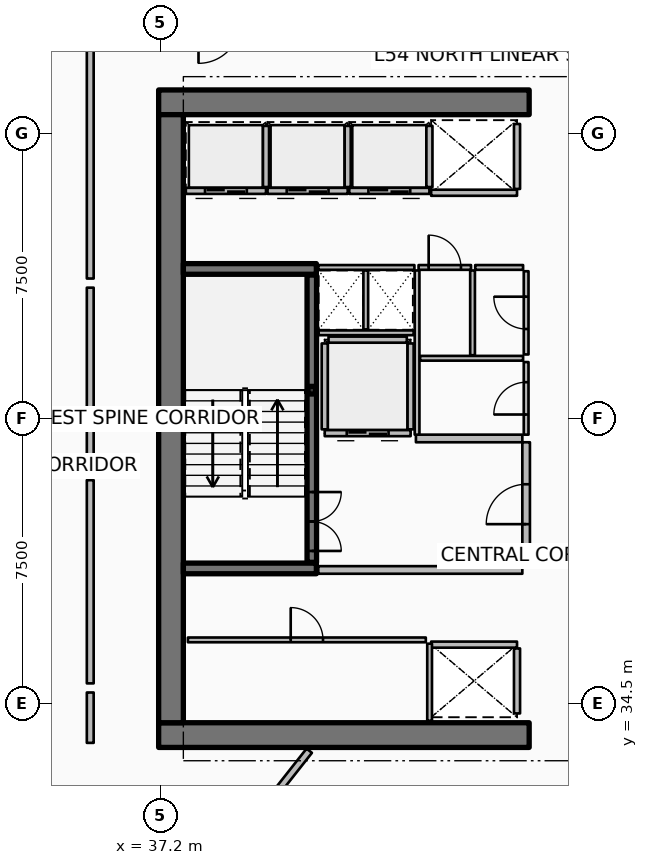
"""IFC4 building model, lengths in metres.
Left out: names, types, materials, properties, quantities, classifications, styles, units other than length and angle.
Written with IfcOpenShell. Run it as: python <this file> out.ifc"""

import sys

from ifc_helpers import new_model, si_unit, direction, frame, frame_2d, origin, origin_2d, place, context, subcontext, project, spatial, rectangle, hollow_rectangle, extrude, element, fill, save


model = new_model("IFC4")
c1 = context("Model", 3, precision=1e-05, world=origin(), true_north=direction((0.0, 1.0)))
c2 = subcontext(c1, "Body", "Model", "MODEL_VIEW")
j1 = project(units=[si_unit("LENGTHUNIT", "METRE"), si_unit("PLANEANGLEUNIT", "RADIAN")], contexts=[c1])
p1 = place(None, origin())
s1 = spatial("IfcSite", under=j1, at=p1, CompositionType="ELEMENT")
p2 = place(p1, origin())
s2 = spatial("IfcBuilding", under=s1, at=p2, CompositionType="ELEMENT")
p3 = place(p2, frame((0.0, 0.0, 214.05)))
s3 = spatial("IfcBuildingStorey", under=s2, at=p3, CompositionType="ELEMENT", Elevation=214.05)
for number, where, z_axis, x_axis in (
    (1, (37.15, 33.675, 0.0), (0.0, 0.0, 1.0), (1.0, 0.0, 0.0)),
    (2, (37.15, 50.325, 0.0), (0.0, 0.0, 1.0), (1.0, 0.0, 0.0)),
):
    element("IfcWall", number, at=place(p3, frame(where, z_axis=z_axis, x_axis=x_axis)), inside=s3, PredefinedType="SHEAR", context=c2, shape_type="SweptSolid", body=[
        extrude(rectangle(XDim=9.75, YDim=0.65, at=frame_2d((4.875, 0.0))), origin(), (0.0, 0.0, 1.0), 3.75),
    ])
p4 = place(p3, frame((37.475, 34.0, 0.0), z_axis=(0.0, 0.0, 1.0), x_axis=(0.0, 1.0, 0.0)))
e3 = element("IfcWall", 3, at=p4, inside=s3, PredefinedType="SHEAR", context=c2, shape_type="SweptSolid", body=[
    extrude(rectangle(XDim=16.0, YDim=0.65, at=frame_2d((8.0, 0.0))), origin(), (0.0, 0.0, 1.0), 3.75),
])
for number, where, z_axis, x_axis in (
    (4, (37.8, 38.06, 0.0), (0.0, 0.0, 1.0), (1.0, 0.0, 0.0)),
    (5, (37.8, 45.94, 0.0), (0.0, 0.0, 1.0), (1.0, 0.0, 0.0)),
):
    element("IfcWall", number, at=place(p3, frame(where, z_axis=z_axis, x_axis=x_axis)), inside=s3, PredefinedType="SHEAR", context=c2, shape_type="SweptSolid", body=[
        extrude(rectangle(XDim=3.5, YDim=0.28, at=frame_2d((1.75, 0.0))), origin(), (0.0, 0.0, 1.0), 3.75),
    ])
p5 = place(p3, frame((41.18, 42.75, 0.0), z_axis=(0.0, 0.0, 1.0), x_axis=(1.0, 0.0, 0.0)))
e6 = element("IfcColumn", 6, at=p5, inside=s3, PredefinedType="COLUMN", context=c2, shape_type="SweptSolid", body=[
    extrude(hollow_rectangle(XDim=0.2, YDim=0.2, WallThickness=0.01, InnerFilletRadius=0.01, OuterFilletRadius=0.02, at=origin_2d()), origin(), (0.0, 0.0, 1.0), 1.67),
])
p6 = place(p3, frame((41.18, 38.22, 0.0), z_axis=(0.0, 0.0, 1.0), x_axis=(0.0, 1.0, 0.0)))
e7 = element("IfcWall", 7, at=p6, inside=s3, PredefinedType="SOLIDWALL", context=c2, shape_type="SweptSolid", body=[
    extrude(rectangle(XDim=7.56, YDim=0.25, at=frame_2d((3.78, 0.0))), origin(), (0.0, 0.0, 1.0), 3.5),
])
p7 = place(p6, frame((0.3, 0.0, 0.0)))
e8 = element("IfcOpeningElement", 8, at=p7, cuts=e7, PredefinedType="OPENING", context=c2, shape_type="SweptSolid", body=[
    extrude(rectangle(XDim=1.55, YDim=2.15, at=frame_2d((0.775, 1.075))), frame((0.0, 0.135, 0.0), z_axis=(0.0, -1.0, 0.0), x_axis=(1.0, 0.0, 0.0)), (0.0, 0.0, 1.0), 0.27),
])
p8 = place(p3, frame((39.975, 47.995, 0.0), z_axis=(0.0, 0.0, 1.0), x_axis=(-1.0, 0.0, 0.0)))
e9 = element("IfcWall", 9, at=p8, inside=s3, PredefinedType="PARTITIONING", context=c2, shape_type="SweptSolid", body=[
    extrude(rectangle(XDim=2.11, YDim=0.16, at=frame_2d((1.055, 0.0))), origin(), (0.0, 0.0, 1.0), 3.5),
])
p9 = place(p8, frame((0.505, 0.0, 0.0)))
e10 = element("IfcOpeningElement", 10, at=p9, cuts=e9, PredefinedType="OPENING", context=c2, shape_type="SweptSolid", body=[
    extrude(rectangle(XDim=1.1, YDim=2.1, at=frame_2d((0.55, 1.05))), frame((0.0, 0.09, 0.0), z_axis=(0.0, -1.0, 0.0), x_axis=(1.0, 0.0, 0.0)), (0.0, 0.0, 1.0), 0.18),
])
p10 = place(p3, frame((39.975, 48.095, 0.0), z_axis=(0.0, 0.0, 1.0), x_axis=(0.0, 1.0, 0.0)))
e11 = element("IfcWall", 11, at=p10, inside=s3, PredefinedType="PARTITIONING", context=c2, shape_type="SweptSolid", body=[
    extrude(rectangle(XDim=1.61, YDim=0.16, at=frame_2d((0.805, 0.0))), origin(), (0.0, 0.0, 1.0), 3.5),
])
p11 = place(p3, frame((42.125, 47.995, 0.0), z_axis=(0.0, 0.0, 1.0), x_axis=(-1.0, 0.0, 0.0)))
e12 = element("IfcWall", 12, at=p11, inside=s3, PredefinedType="PARTITIONING", context=c2, shape_type="SweptSolid", body=[
    extrude(rectangle(XDim=2.11, YDim=0.16, at=frame_2d((1.055, 0.0))), origin(), (0.0, 0.0, 1.0), 3.5),
])
p12 = place(p11, frame((0.505, 0.0, 0.0)))
e13 = element("IfcOpeningElement", 13, at=p12, cuts=e12, PredefinedType="OPENING", context=c2, shape_type="SweptSolid", body=[
    extrude(rectangle(XDim=1.1, YDim=2.1, at=frame_2d((0.55, 1.05))), frame((0.0, 0.09, 0.0), z_axis=(0.0, -1.0, 0.0), x_axis=(1.0, 0.0, 0.0)), (0.0, 0.0, 1.0), 0.18),
])
p13 = place(p3, frame((42.125, 48.095, 0.0), z_axis=(0.0, 0.0, 1.0), x_axis=(0.0, 1.0, 0.0)))
e14 = element("IfcWall", 14, at=p13, inside=s3, PredefinedType="PARTITIONING", context=c2, shape_type="SweptSolid", body=[
    extrude(rectangle(XDim=1.61, YDim=0.16, at=frame_2d((0.805, 0.0))), origin(), (0.0, 0.0, 1.0), 3.5),
])
p14 = place(p3, frame((44.275, 47.995, 0.0), z_axis=(0.0, 0.0, 1.0), x_axis=(-1.0, 0.0, 0.0)))
e15 = element("IfcWall", 15, at=p14, inside=s3, PredefinedType="PARTITIONING", context=c2, shape_type="SweptSolid", body=[
    extrude(rectangle(XDim=2.11, YDim=0.16, at=frame_2d((1.055, 0.0))), origin(), (0.0, 0.0, 1.0), 3.5),
])
p15 = place(p14, frame((0.505, 0.0, 0.0)))
e16 = element("IfcOpeningElement", 16, at=p15, cuts=e15, PredefinedType="OPENING", context=c2, shape_type="SweptSolid", body=[
    extrude(rectangle(XDim=1.1, YDim=2.1, at=frame_2d((0.55, 1.05))), frame((0.0, 0.09, 0.0), z_axis=(0.0, -1.0, 0.0), x_axis=(1.0, 0.0, 0.0)), (0.0, 0.0, 1.0), 0.18),
])
p16 = place(p3, frame((44.275, 48.095, 0.0), z_axis=(0.0, 0.0, 1.0), x_axis=(0.0, 1.0, 0.0)))
e17 = element("IfcWall", 17, at=p16, inside=s3, PredefinedType="PARTITIONING", context=c2, shape_type="SweptSolid", body=[
    extrude(rectangle(XDim=1.61, YDim=0.16, at=frame_2d((0.805, 0.0))), origin(), (0.0, 0.0, 1.0), 3.5),
])
p17 = place(p3, frame((46.58, 47.945, 0.0), z_axis=(0.0, 0.0, 1.0), x_axis=(-1.0, 0.0, 0.0)))
e18 = element("IfcWall", 18, at=p17, inside=s3, PredefinedType="PARTITIONING", context=c2, shape_type="SweptSolid", body=[
    extrude(rectangle(XDim=2.26, YDim=0.16, at=frame_2d((1.13, 0.0))), origin(), (0.0, 0.0, 1.0), 3.5),
])
p18 = place(p3, frame((46.58, 48.045, 0.0), z_axis=(0.0, 0.0, 1.0), x_axis=(0.0, 1.0, 0.0)))
e19 = element("IfcWall", 19, at=p18, inside=s3, PredefinedType="PARTITIONING", context=c2, shape_type="SweptSolid", body=[
    extrude(rectangle(XDim=1.71, YDim=0.16, at=frame_2d((0.855, 0.0))), origin(), (0.0, 0.0, 1.0), 3.5),
])
p19 = place(p3, frame((44.32, 36.055, 0.0), z_axis=(0.0, 0.0, 1.0), x_axis=(1.0, 0.0, 0.0)))
e20 = element("IfcWall", 20, at=p19, inside=s3, PredefinedType="PARTITIONING", context=c2, shape_type="SweptSolid", body=[
    extrude(rectangle(XDim=2.26, YDim=0.16, at=frame_2d((1.13, 0.0))), origin(), (0.0, 0.0, 1.0), 3.5),
])
p20 = place(p3, frame((46.58, 34.245, 0.0), z_axis=(0.0, 0.0, 1.0), x_axis=(0.0, 1.0, 0.0)))
e21 = element("IfcWall", 21, at=p20, inside=s3, PredefinedType="PARTITIONING", context=c2, shape_type="SweptSolid", body=[
    extrude(rectangle(XDim=1.71, YDim=0.16, at=frame_2d((0.855, 0.0))), origin(), (0.0, 0.0, 1.0), 3.5),
])
p21 = place(p3, frame((43.78, 41.62, 0.0), z_axis=(0.0, 0.0, 1.0), x_axis=(-1.0, 0.0, 0.0)))
e22 = element("IfcWall", 22, at=p21, inside=s3, PredefinedType="PARTITIONING", context=c2, shape_type="SweptSolid", body=[
    extrude(rectangle(XDim=2.26, YDim=0.16, at=frame_2d((1.13, 0.0))), origin(), (0.0, 0.0, 1.0), 3.5),
])
p22 = place(p21, frame((0.58, 0.0, 0.0)))
e23 = element("IfcOpeningElement", 23, at=p22, cuts=e22, PredefinedType="OPENING", context=c2, shape_type="SweptSolid", body=[
    extrude(rectangle(XDim=1.1, YDim=2.1, at=frame_2d((0.55, 1.05))), frame((0.0, 0.09, 0.0), z_axis=(0.0, -1.0, 0.0), x_axis=(1.0, 0.0, 0.0)), (0.0, 0.0, 1.0), 0.18),
])
for number, where, z_axis, x_axis in (
    (24, (43.78, 41.72, 0.0), (0.0, 0.0, 1.0), (0.0, 1.0, 0.0)),
    (25, (41.52, 41.72, 0.0), (0.0, 0.0, 1.0), (0.0, 1.0, 0.0)),
):
    element("IfcWall", number, at=place(p3, frame(where, z_axis=z_axis, x_axis=x_axis)), inside=s3, PredefinedType="PARTITIONING", context=c2, shape_type="SweptSolid", body=[
        extrude(rectangle(XDim=2.26, YDim=0.16, at=frame_2d((1.13, 0.0))), origin(), (0.0, 0.0, 1.0), 3.5),
    ])
p23 = place(p3, frame((41.62, 44.08, 0.0), z_axis=(0.0, 0.0, 1.0), x_axis=(1.0, 0.0, 0.0)))
e26 = element("IfcWall", 26, at=p23, inside=s3, PredefinedType="PARTITIONING", context=c2, shape_type="SweptSolid", body=[
    extrude(rectangle(XDim=2.06, YDim=0.16, at=frame_2d((1.03, 0.0))), origin(), (0.0, 0.0, 1.0), 3.5),
])
p24 = place(p3, frame((44.28, 34.05, 0.0), z_axis=(0.0, 0.0, 1.0), x_axis=(0.0, 1.0, 0.0)))
e27 = element("IfcWall", 27, at=p24, inside=s3, PredefinedType="PARTITIONING", context=c2, shape_type="SweptSolid", body=[
    extrude(rectangle(XDim=2.03, YDim=0.125, at=frame_2d((1.015, 0.0))), origin(), (0.0, 0.0, 1.0), 2.94),
])
p25 = place(p3, frame((37.92, 36.18, 0.0), z_axis=(0.0, 0.0, 1.0), x_axis=(1.0, 0.0, 0.0)))
e28 = element("IfcWall", 28, at=p25, inside=s3, PredefinedType="PARTITIONING", context=c2, shape_type="SweptSolid", body=[
    extrude(rectangle(XDim=6.26, YDim=0.125, at=frame_2d((3.13, 0.0))), origin(), (0.0, 0.0, 1.0), 2.94),
])
p26 = place(p25, frame((2.705, 0.0, 0.0)))
e29 = element("IfcOpeningElement", 29, at=p26, cuts=e28, PredefinedType="OPENING", context=c2, shape_type="SweptSolid", body=[
    extrude(rectangle(XDim=0.85, YDim=2.06, at=frame_2d((0.425, 1.03))), frame((0.0, 0.073, 0.0), z_axis=(0.0, -1.0, 0.0), x_axis=(1.0, 0.0, 0.0)), (0.0, 0.0, 1.0), 0.145),
])
p27 = place(p3, frame((41.35, 38.02, 0.0), z_axis=(0.0, 0.0, 1.0), x_axis=(1.0, 0.0, 0.0)))
e30 = element("IfcWall", 30, at=p27, inside=s3, PredefinedType="PARTITIONING", context=c2, shape_type="SweptSolid", body=[
    extrude(rectangle(XDim=5.37, YDim=0.2, at=frame_2d((2.685, 0.0))), origin(), (0.0, 0.0, 1.0), 3.5),
])
p28 = place(p3, frame((43.92, 41.48, 0.0), z_axis=(0.0, 0.0, 1.0), x_axis=(1.0, 0.0, 0.0)))
e31 = element("IfcWall", 31, at=p28, inside=s3, PredefinedType="PARTITIONING", context=c2, shape_type="SweptSolid", body=[
    extrude(rectangle(XDim=2.8, YDim=0.2, at=frame_2d((1.4, 0.0))), origin(), (0.0, 0.0, 1.0), 3.5),
])
p29 = place(p3, frame((46.82, 38.12, 0.0), z_axis=(0.0, 0.0, 1.0), x_axis=(0.0, 1.0, 0.0)))
e32 = element("IfcWall", 32, at=p29, inside=s3, PredefinedType="PARTITIONING", context=c2, shape_type="SweptSolid", body=[
    extrude(rectangle(XDim=3.26, YDim=0.2, at=frame_2d((1.63, 0.0))), origin(), (0.0, 0.0, 1.0), 3.5),
])
p30 = place(p29, frame((1.105, 0.0, 0.0)))
e33 = element("IfcOpeningElement", 33, at=p30, cuts=e32, PredefinedType="OPENING", context=c2, shape_type="SweptSolid", body=[
    extrude(rectangle(XDim=1.05, YDim=2.1, at=frame_2d((0.525, 1.05))), frame((0.0, 0.11, 0.0), z_axis=(0.0, -1.0, 0.0), x_axis=(1.0, 0.0, 0.0)), (0.0, 0.0, 1.0), 0.22),
])
p31 = place(p3, frame((41.36, 44.26, 0.0), z_axis=(0.0, 0.0, 1.0), x_axis=(1.0, 0.0, 0.0)))
e34 = element("IfcWall", 34, at=p31, inside=s3, PredefinedType="PARTITIONING", context=c2, shape_type="SweptSolid", body=[
    extrude(rectangle(XDim=2.5, YDim=0.125, at=frame_2d((1.25, 0.0))), origin(), (0.0, 0.0, 1.0), 2.94),
])
p32 = place(p3, frame((42.6, 44.35, 0.0), z_axis=(0.0, 0.0, 1.0), x_axis=(0.0, 1.0, 0.0)))
e35 = element("IfcWall", 35, at=p32, inside=s3, PredefinedType="PARTITIONING", context=c2, shape_type="SweptSolid", body=[
    extrude(rectangle(XDim=1.55, YDim=0.125, at=frame_2d((0.775, 0.0))), origin(), (0.0, 0.0, 1.0), 2.94),
])
p33 = place(p3, frame((43.95, 41.58, 0.0), z_axis=(0.0, 0.0, 1.0), x_axis=(0.0, 1.0, 0.0)))
e36 = element("IfcWall", 36, at=p33, inside=s3, PredefinedType="PARTITIONING", context=c2, shape_type="SweptSolid", body=[
    extrude(rectangle(XDim=4.32, YDim=0.125, at=frame_2d((2.16, 0.0))), origin(), (0.0, 0.0, 1.0), 2.94),
])
p34 = place(p3, frame((44.03, 43.59, 0.0), z_axis=(0.0, 0.0, 1.0), x_axis=(1.0, 0.0, 0.0)))
e37 = element("IfcWall", 37, at=p34, inside=s3, PredefinedType="PARTITIONING", context=c2, shape_type="SweptSolid", body=[
    extrude(rectangle(XDim=2.71, YDim=0.125, at=frame_2d((1.355, 0.0))), origin(), (0.0, 0.0, 1.0), 2.94),
])
p35 = place(p3, frame((45.41, 43.67, 0.0), z_axis=(0.0, 0.0, 1.0), x_axis=(0.0, 1.0, 0.0)))
e38 = element("IfcWall", 38, at=p35, inside=s3, PredefinedType="PARTITIONING", context=c2, shape_type="SweptSolid", body=[
    extrude(rectangle(XDim=2.23, YDim=0.125, at=frame_2d((1.115, 0.0))), origin(), (0.0, 0.0, 1.0), 2.94),
])
p36 = place(p3, frame((46.82, 41.58, 0.0), z_axis=(0.0, 0.0, 1.0), x_axis=(0.0, 1.0, 0.0)))
e39 = element("IfcWall", 39, at=p36, inside=s3, PredefinedType="PARTITIONING", context=c2, shape_type="SweptSolid", body=[
    extrude(rectangle(XDim=1.91, YDim=0.125, at=frame_2d((0.955, 0.0))), origin(), (0.0, 0.0, 1.0), 2.94),
])
p37 = place(p36, frame((0.53, 0.0, 0.0)))
e40 = element("IfcOpeningElement", 40, at=p37, cuts=e39, PredefinedType="OPENING", context=c2, shape_type="SweptSolid", body=[
    extrude(rectangle(XDim=0.85, YDim=2.06, at=frame_2d((0.425, 1.03))), frame((0.0, 0.073, 0.0), z_axis=(0.0, -1.0, 0.0), x_axis=(1.0, 0.0, 0.0)), (0.0, 0.0, 1.0), 0.145),
])
p38 = place(p3, frame((46.82, 43.69, 0.0), z_axis=(0.0, 0.0, 1.0), x_axis=(0.0, 1.0, 0.0)))
e41 = element("IfcWall", 41, at=p38, inside=s3, PredefinedType="PARTITIONING", context=c2, shape_type="SweptSolid", body=[
    extrude(rectangle(XDim=2.19, YDim=0.125, at=frame_2d((1.095, 0.0))), origin(), (0.0, 0.0, 1.0), 2.94),
])
p39 = place(p38, frame((0.67, 0.0, 0.0)))
e42 = element("IfcOpeningElement", 42, at=p39, cuts=e41, PredefinedType="OPENING", context=c2, shape_type="SweptSolid", body=[
    extrude(rectangle(XDim=0.85, YDim=2.06, at=frame_2d((0.425, 1.03))), frame((0.0, 0.073, 0.0), z_axis=(0.0, -1.0, 0.0), x_axis=(1.0, 0.0, 0.0)), (0.0, 0.0, 1.0), 0.145),
])
p40 = place(p3, frame((41.35, 45.98, 0.0), z_axis=(0.0, 0.0, 1.0), x_axis=(1.0, 0.0, 0.0)))
e43 = element("IfcWall", 43, at=p40, inside=s3, PredefinedType="PARTITIONING", context=c2, shape_type="SweptSolid", body=[
    extrude(rectangle(XDim=2.53, YDim=0.125, at=frame_2d((1.265, 0.0))), origin(), (0.0, 0.0, 1.0), 2.94),
])
p41 = place(p3, frame((43.99, 45.98, 0.0), z_axis=(0.0, 0.0, 1.0), x_axis=(1.0, 0.0, 0.0)))
e44 = element("IfcWall", 44, at=p41, inside=s3, PredefinedType="PARTITIONING", context=c2, shape_type="SweptSolid", body=[
    extrude(rectangle(XDim=1.38, YDim=0.125, at=frame_2d((0.69, 0.0))), origin(), (0.0, 0.0, 1.0), 2.94),
])
p42 = place(p41, frame((0.265, 0.0, 0.0)))
e45 = element("IfcOpeningElement", 45, at=p42, cuts=e44, PredefinedType="OPENING", context=c2, shape_type="SweptSolid", body=[
    extrude(rectangle(XDim=0.85, YDim=2.06, at=frame_2d((0.425, 1.03))), frame((0.0, 0.073, 0.0), z_axis=(0.0, -1.0, 0.0), x_axis=(1.0, 0.0, 0.0)), (0.0, 0.0, 1.0), 0.145),
])
p43 = place(p3, frame((45.48, 45.98, 0.0), z_axis=(0.0, 0.0, 1.0), x_axis=(1.0, 0.0, 0.0)))
e46 = element("IfcWall", 46, at=p43, inside=s3, PredefinedType="PARTITIONING", context=c2, shape_type="SweptSolid", body=[
    extrude(rectangle(XDim=1.26, YDim=0.125, at=frame_2d((0.63, 0.0))), origin(), (0.0, 0.0, 1.0), 2.94),
])
p44 = place(p3, frame((41.113, 33.264, 0.0), z_axis=(0.0, 0.0, 1.0), x_axis=(-0.619089233189, -0.785320648748, 0.0)))
e47 = element("IfcWall", 47, at=p44, inside=s3, PredefinedType="PARTITIONING", context=c2, shape_type="SweptSolid", body=[
    extrude(rectangle(XDim=16.006, YDim=0.18, at=frame_2d((8.003, 0.0))), origin(), (0.0, 0.0, 1.0), 2.94),
])
p45 = place(p3, frame((35.35, 51.853, 0.0), z_axis=(0.0, 0.0, 1.0), x_axis=(0.0, -1.0, 0.0)))
e48 = element("IfcWall", 48, at=p45, inside=s3, PredefinedType="PARTITIONING", context=c2, shape_type="SweptSolid", body=[
    extrude(rectangle(XDim=6.165, YDim=0.18, at=frame_2d((3.083, 0.0))), origin(), (0.0, 0.0, 1.0), 2.94),
])
p46 = place(p3, frame((35.35, 45.448, 0.0), z_axis=(0.0, 0.0, 1.0), x_axis=(0.0, -1.0, 0.0)))
e49 = element("IfcWall", 49, at=p46, inside=s3, PredefinedType="PARTITIONING", context=c2, shape_type="SweptSolid", body=[
    extrude(rectangle(XDim=4.825, YDim=0.18, at=frame_2d((2.413, 0.0))), origin(), (0.0, 0.0, 1.0), 2.94),
])
p47 = place(p3, frame((35.35, 40.383, 0.0), z_axis=(0.0, 0.0, 1.0), x_axis=(0.0, -1.0, 0.0)))
e50 = element("IfcWall", 50, at=p47, inside=s3, PredefinedType="PARTITIONING", context=c2, shape_type="SweptSolid", body=[
    extrude(rectangle(XDim=5.347, YDim=0.18, at=frame_2d((2.674, 0.0))), origin(), (0.0, 0.0, 1.0), 2.94),
])
p48 = place(p3, frame((35.35, 34.796, 0.0), z_axis=(0.0, 0.0, 1.0), x_axis=(0.0, -1.0, 0.0)))
e51 = element("IfcWall", 51, at=p48, inside=s3, PredefinedType="PARTITIONING", context=c2, shape_type="SweptSolid", body=[
    extrude(rectangle(XDim=1.326, YDim=0.18, at=frame_2d((0.663, 0.0))), origin(), (0.0, 0.0, 1.0), 2.94),
])
p49 = place(p7, origin())
e52 = element("IfcDoor", 52, at=p49, inside=s3, OperationType="DOUBLE_DOOR_SINGLE_SWING", PredefinedType="DOOR", context=c2, shape_type="SweptSolid", body=[
    extrude(rectangle(XDim=1.55, YDim=2.15, at=frame_2d((0.775, 1.075))), frame((0.0, 0.025, 0.0), z_axis=(0.0, -1.0, 0.0), x_axis=(1.0, 0.0, 0.0)), (0.0, 0.0, 1.0), 0.05),
])
fill(e8, e52)
p50 = place(p9, origin())
e53 = element("IfcDoor", 53, at=p50, inside=s3, OperationType="DOUBLE_DOOR_SLIDING", PredefinedType="DOOR", context=c2, shape_type="SweptSolid", body=[
    extrude(rectangle(XDim=1.1, YDim=2.1, at=frame_2d((0.55, 1.05))), frame((0.0, 0.025, 0.0), z_axis=(0.0, -1.0, 0.0), x_axis=(1.0, 0.0, 0.0)), (0.0, 0.0, 1.0), 0.05),
])
fill(e10, e53)
p51 = place(p12, origin())
e54 = element("IfcDoor", 54, at=p51, inside=s3, OperationType="DOUBLE_DOOR_SLIDING", PredefinedType="DOOR", context=c2, shape_type="SweptSolid", body=[
    extrude(rectangle(XDim=1.1, YDim=2.1, at=frame_2d((0.55, 1.05))), frame((0.0, 0.025, 0.0), z_axis=(0.0, -1.0, 0.0), x_axis=(1.0, 0.0, 0.0)), (0.0, 0.0, 1.0), 0.05),
])
fill(e13, e54)
p52 = place(p15, origin())
e55 = element("IfcDoor", 55, at=p52, inside=s3, OperationType="DOUBLE_DOOR_SLIDING", PredefinedType="DOOR", context=c2, shape_type="SweptSolid", body=[
    extrude(rectangle(XDim=1.1, YDim=2.1, at=frame_2d((0.55, 1.05))), frame((0.0, 0.025, 0.0), z_axis=(0.0, -1.0, 0.0), x_axis=(1.0, 0.0, 0.0)), (0.0, 0.0, 1.0), 0.05),
])
fill(e16, e55)
p53 = place(p22, origin())
e56 = element("IfcDoor", 56, at=p53, inside=s3, OperationType="DOUBLE_DOOR_SLIDING", PredefinedType="DOOR", context=c2, shape_type="SweptSolid", body=[
    extrude(rectangle(XDim=1.1, YDim=2.1, at=frame_2d((0.55, 1.05))), frame((0.0, 0.025, 0.0), z_axis=(0.0, -1.0, 0.0), x_axis=(1.0, 0.0, 0.0)), (0.0, 0.0, 1.0), 0.05),
])
fill(e23, e56)
p54 = place(p26, origin())
e57 = element("IfcDoor", 57, at=p54, inside=s3, OperationType="SINGLE_SWING_LEFT", PredefinedType="DOOR", context=c2, shape_type="SweptSolid", body=[
    extrude(rectangle(XDim=0.85, YDim=2.06, at=frame_2d((0.425, 1.03))), frame((0.0, 0.025, 0.0), z_axis=(0.0, -1.0, 0.0), x_axis=(1.0, 0.0, 0.0)), (0.0, 0.0, 1.0), 0.05),
])
fill(e29, e57)
p55 = place(p30, origin())
e58 = element("IfcDoor", 58, at=p55, inside=s3, OperationType="SINGLE_SWING_LEFT", PredefinedType="DOOR", context=c2, shape_type="SweptSolid", body=[
    extrude(rectangle(XDim=1.05, YDim=2.1, at=frame_2d((0.525, 1.05))), frame((0.0, 0.025, 0.0), z_axis=(0.0, -1.0, 0.0), x_axis=(1.0, 0.0, 0.0)), (0.0, 0.0, 1.0), 0.05),
])
fill(e33, e58)
p56 = place(p37, origin())
e59 = element("IfcDoor", 59, at=p56, inside=s3, OperationType="SINGLE_SWING_LEFT", PredefinedType="DOOR", context=c2, shape_type="SweptSolid", body=[
    extrude(rectangle(XDim=0.85, YDim=2.06, at=frame_2d((0.425, 1.03))), frame((0.0, 0.025, 0.0), z_axis=(0.0, -1.0, 0.0), x_axis=(1.0, 0.0, 0.0)), (0.0, 0.0, 1.0), 0.05),
])
fill(e40, e59)
p57 = place(p39, origin())
e60 = element("IfcDoor", 60, at=p57, inside=s3, OperationType="SINGLE_SWING_RIGHT", PredefinedType="DOOR", context=c2, shape_type="SweptSolid", body=[
    extrude(rectangle(XDim=0.85, YDim=2.06, at=frame_2d((0.425, 1.03))), frame((0.0, 0.025, 0.0), z_axis=(0.0, -1.0, 0.0), x_axis=(1.0, 0.0, 0.0)), (0.0, 0.0, 1.0), 0.05),
])
fill(e42, e60)
p58 = place(p42, origin())
e61 = element("IfcDoor", 61, at=p58, inside=s3, OperationType="SINGLE_SWING_LEFT", PredefinedType="DOOR", context=c2, shape_type="SweptSolid", body=[
    extrude(rectangle(XDim=0.85, YDim=2.06, at=frame_2d((0.425, 1.03))), frame((0.0, 0.025, 0.0), z_axis=(0.0, -1.0, 0.0), x_axis=(1.0, 0.0, 0.0)), (0.0, 0.0, 1.0), 0.05),
])
fill(e45, e61)
save(model, sys.argv[1])
